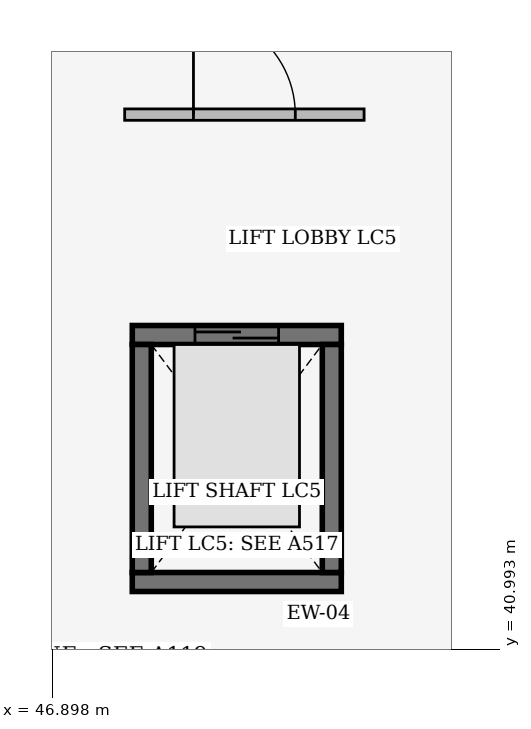
"""IFC4 building model, lengths in metres.
Left out: names, types, materials, properties, quantities, classifications, styles, units other than length and angle.
Written with IfcOpenShell. Run it as: python <this file> out.ifc"""

import sys

from ifc_helpers import new_model, si_unit, direction, frame, frame_2d, origin, place, context, subcontext, project, spatial, rectangle, extrude, element, fill, save


model = new_model("IFC4")
c1 = context("Model", 3, precision=1e-05, world=origin(), true_north=direction((0.0, 1.0)))
c2 = subcontext(c1, "Body", "Model", "MODEL_VIEW")
j1 = project(units=[si_unit("LENGTHUNIT", "METRE"), si_unit("PLANEANGLEUNIT", "RADIAN")], contexts=[c1])
p1 = place(None, origin())
s1 = spatial("IfcSite", under=j1, at=p1, CompositionType="ELEMENT")
p2 = place(p1, origin())
s2 = spatial("IfcBuilding", under=s1, at=p2, CompositionType="ELEMENT")
p3 = place(p2, origin())
s3 = spatial("IfcBuildingStorey", under=s2, at=p3, CompositionType="ELEMENT", Elevation=0.0)
p4 = place(p3, frame((47.95, 41.875, 0.0), z_axis=(0.0, 0.0, 1.0), x_axis=(1.0, 0.0, 0.0)))
e1 = element("IfcWall", 1, at=p4, inside=s3, PredefinedType="SHEAR", context=c2, shape_type="SweptSolid", body=[
    extrude(rectangle(XDim=2.75, YDim=0.25, at=frame_2d((1.375, 0.0))), origin(), (0.0, 0.0, 1.0), 5.1),
])
p5 = place(p3, frame((47.95, 45.125, 0.0), z_axis=(0.0, 0.0, 1.0), x_axis=(1.0, 0.0, 0.0)))
e2 = element("IfcWall", 2, at=p5, inside=s3, PredefinedType="SHEAR", context=c2, shape_type="SweptSolid", body=[
    extrude(rectangle(XDim=2.75, YDim=0.25, at=frame_2d((1.375, 0.0))), origin(), (0.0, 0.0, 1.0), 5.1),
])
p6 = place(p5, frame((0.825, 0.0, 0.0)))
e3 = element("IfcOpeningElement", 3, at=p6, cuts=e2, PredefinedType="OPENING", context=c2, shape_type="SweptSolid", body=[
    extrude(rectangle(XDim=1.1, YDim=2.2, at=frame_2d((0.55, 1.1))), frame((0.0, 0.135, 0.0), z_axis=(0.0, -1.0, 0.0), x_axis=(1.0, 0.0, 0.0)), (0.0, 0.0, 1.0), 0.27),
])
for number, where, z_axis, x_axis in (
    (4, (48.075, 42.0, 0.0), (0.0, 0.0, 1.0), (0.0, 1.0, 0.0)),
    (5, (50.575, 42.0, 0.0), (0.0, 0.0, 1.0), (0.0, 1.0, 0.0)),
):
    element("IfcWall", number, at=place(p3, frame(where, z_axis=z_axis, x_axis=x_axis)), inside=s3, PredefinedType="SHEAR", context=c2, shape_type="SweptSolid", body=[
        extrude(rectangle(XDim=3.0, YDim=0.25, at=frame_2d((1.5, 0.0))), origin(), (0.0, 0.0, 1.0), 5.1),
    ])
p7 = place(p3, frame((47.85, 48.025, 0.0), z_axis=(0.0, 0.0, 1.0), x_axis=(1.0, 0.0, 0.0)))
e6 = element("IfcWall", 6, at=p7, inside=s3, PredefinedType="PARTITIONING", context=c2, shape_type="SweptSolid", body=[
    extrude(rectangle(XDim=3.15, YDim=0.15, at=frame_2d((1.575, 0.0))), origin(), (0.0, 0.0, 1.0), 4.814),
])
p8 = place(p7, frame((0.905, 0.0, 0.0)))
e7 = element("IfcOpeningElement", 7, at=p8, cuts=e6, PredefinedType="OPENING", context=c2, shape_type="SweptSolid", body=[
    extrude(rectangle(XDim=1.34, YDim=2.28, at=frame_2d((0.67, 1.14))), frame((0.0, 0.085, 0.0), z_axis=(0.0, -1.0, 0.0), x_axis=(1.0, 0.0, 0.0)), (0.0, 0.0, 1.0), 0.17),
])
p9 = place(p6, origin())
e8 = element("IfcDoor", 8, at=p9, inside=s3, OperationType="DOUBLE_DOOR_SLIDING", PredefinedType="DOOR", context=c2, shape_type="SweptSolid", body=[
    extrude(rectangle(XDim=1.1, YDim=2.2, at=frame_2d((0.55, 1.1))), frame((0.0, 0.025, 0.0), z_axis=(0.0, -1.0, 0.0), x_axis=(1.0, 0.0, 0.0)), (0.0, 0.0, 1.0), 0.05),
])
fill(e3, e8)
p10 = place(p8, origin())
e9 = element("IfcDoor", 9, at=p10, inside=s3, OperationType="SINGLE_SWING_LEFT", PredefinedType="DOOR", context=c2, shape_type="SweptSolid", body=[
    extrude(rectangle(XDim=1.34, YDim=2.28, at=frame_2d((0.67, 1.14))), frame((0.0, 0.025, 0.0), z_axis=(0.0, -1.0, 0.0), x_axis=(1.0, 0.0, 0.0)), (0.0, 0.0, 1.0), 0.05),
])
fill(e7, e9)
save(model, sys.argv[1])
